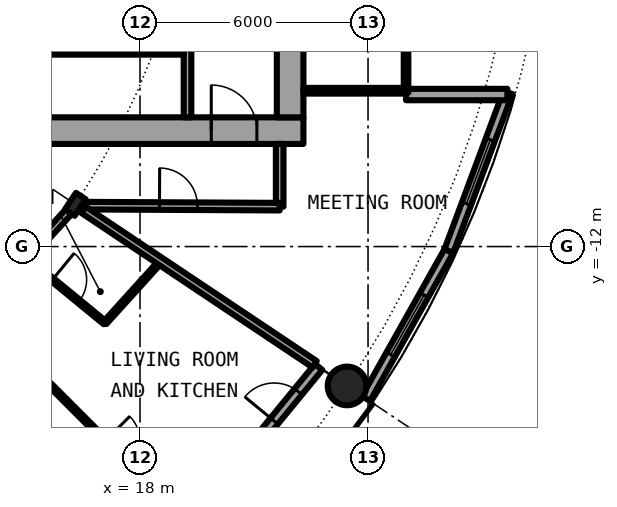
"""IFC4 building model, lengths in metres.
Left out: names, types, materials, properties, quantities, classifications, styles, units other than length and angle.
Written with IfcOpenShell. Run it as: python <this file> out.ifc"""

import sys

from ifc_helpers import new_model, si_unit, direction, frame, frame_2d, origin, origin_2d, place, context, subcontext, project, spatial, rectangle, hollow_circle, i_section, extrude, element, fill, save


model = new_model("IFC4")
c1 = context("Model", 3, precision=1e-05, world=origin(), true_north=direction((0.0, 1.0)))
c2 = subcontext(c1, "Body", "Model", "MODEL_VIEW")
j1 = project(units=[si_unit("LENGTHUNIT", "METRE"), si_unit("PLANEANGLEUNIT", "RADIAN")], contexts=[c1])
p1 = place(None, origin())
s1 = spatial("IfcSite", under=j1, at=p1, CompositionType="ELEMENT")
p2 = place(p1, origin())
s2 = spatial("IfcBuilding", under=s1, at=p2, CompositionType="ELEMENT")
p3 = place(p2, frame((0.0, 0.0, 75.8)))
s3 = spatial("IfcBuildingStorey", under=s2, at=p3, CompositionType="ELEMENT", Elevation=75.8)
p4 = place(p3, frame((23.448, -15.667, 0.0), z_axis=(0.0, 0.0, 1.0), x_axis=(1.0, 0.0, 0.0)))
e1 = element("IfcColumn", 1, at=p4, inside=s3, PredefinedType="COLUMN", context=c2, shape_type="SweptSolid", body=[
    extrude(hollow_circle(Radius=0.508, WallThickness=0.04, at=origin_2d()), origin(), (0.0, 0.0, 1.0), 3.05),
])
p5 = place(p3, frame((16.297, -10.889, 0.0), z_axis=(0.0, 0.0, 1.0), x_axis=(0.831469612303, -0.55557023302, 0.0)))
e2 = element("IfcColumn", 2, at=p5, inside=s3, PredefinedType="COLUMN", context=c2, shape_type="SweptSolid", body=[
    extrude(i_section(OverallWidth=0.306, OverallDepth=0.524, WebThickness=0.021, FlangeThickness=0.04, FilletRadius=0.027, at=origin_2d()), origin(), (0.0, 0.0, 1.0), 3.05),
])
p6 = place(p3, frame((19.304, -19.304, 0.0), z_axis=(0.0, 0.0, 1.0), x_axis=(0.634382322723, 0.773019449054, 0.0)))
e3 = element("IfcWall", 3, at=p6, inside=s3, PredefinedType="SOLIDWALL", context=c2, shape_type="SweptSolid", body=[
    extrude(rectangle(XDim=5.352, YDim=0.25, at=frame_2d((2.676, 0.0))), origin(), (0.0, 0.0, 1.0), 2.7),
])
p7 = place(p6, frame((0.441, 0.0, 0.3)))
e4 = element("IfcOpeningElement", 4, at=p7, cuts=e3, PredefinedType="OPENING", context=c2, shape_type="SweptSolid", body=[
    extrude(rectangle(XDim=1.8, YDim=2.1, at=frame_2d((0.9, 1.05))), frame((0.0, 0.135, 0.0), z_axis=(0.0, -1.0, 0.0), x_axis=(1.0, 0.0, 0.0)), (0.0, 0.0, 1.0), 0.27),
])
p8 = place(p6, frame((3.51, 0.0, 0.0)))
e5 = element("IfcOpeningElement", 5, at=p8, cuts=e3, PredefinedType="OPENING", context=c2, shape_type="SweptSolid", body=[
    extrude(rectangle(XDim=1.0, YDim=2.2, at=frame_2d((0.5, 1.1))), frame((0.0, 0.135, 0.0), z_axis=(0.0, -1.0, 0.0), x_axis=(1.0, 0.0, 0.0)), (0.0, 0.0, 1.0), 0.27),
])
p9 = place(p3, frame((23.946, -16.0, 0.0), z_axis=(0.0, 0.0, 1.0), x_axis=(0.489696356642, 0.871893042919, 0.0)))
e6 = element("IfcWall", 6, at=p9, inside=s3, PredefinedType="SOLIDWALL", context=c2, shape_type="SweptSolid", body=[
    extrude(rectangle(XDim=4.454, YDim=0.25, at=frame_2d((2.227, 0.0))), origin(), (0.0, 0.0, 1.0), 2.7),
])
p10 = place(p9, frame((1.327, 0.0, 0.3)))
e7 = element("IfcOpeningElement", 7, at=p10, cuts=e6, PredefinedType="OPENING", context=c2, shape_type="SweptSolid", body=[
    extrude(rectangle(XDim=1.8, YDim=2.1, at=frame_2d((0.9, 1.05))), frame((0.0, 0.135, 0.0), z_axis=(0.0, -1.0, 0.0), x_axis=(1.0, 0.0, 0.0)), (0.0, 0.0, 1.0), 0.27),
])
p11 = place(p3, frame((26.127, -12.117, 0.0), z_axis=(0.0, 0.0, 1.0), x_axis=(0.349247811493, 0.937030397675, 0.0)))
e8 = element("IfcWall", 8, at=p11, inside=s3, PredefinedType="SOLIDWALL", context=c2, shape_type="SweptSolid", body=[
    extrude(rectangle(XDim=4.452, YDim=0.25, at=frame_2d((2.226, 0.0))), origin(), (0.0, 0.0, 1.0), 2.7),
])
p12 = place(p11, frame((1.327, 0.0, 0.3)))
e9 = element("IfcOpeningElement", 9, at=p12, cuts=e8, PredefinedType="OPENING", context=c2, shape_type="SweptSolid", body=[
    extrude(rectangle(XDim=1.8, YDim=2.1, at=frame_2d((0.9, 1.05))), frame((0.0, 0.135, 0.0), z_axis=(0.0, -1.0, 0.0), x_axis=(1.0, 0.0, 0.0)), (0.0, 0.0, 1.0), 0.27),
])
p13 = place(p3, frame((25.0, -8.0, 0.0), z_axis=(0.0, 0.0, 1.0), x_axis=(1.0, 0.0, 0.0)))
e10 = element("IfcWall", 10, at=p13, inside=s3, PredefinedType="SOLIDWALL", context=c2, shape_type="SweptSolid", body=[
    extrude(rectangle(XDim=2.667, YDim=0.3, at=frame_2d((1.333, 0.0))), origin(), (0.0, 0.0, 1.0), 2.7),
])
p14 = place(p3, frame((8.3, -8.95, 0.0), z_axis=(0.0, 0.0, 1.0), x_axis=(1.0, 0.0, 0.0)))
e11 = element("IfcWall", 11, at=p14, inside=s3, PredefinedType="SHEAR", context=c2, shape_type="SweptSolid", body=[
    extrude(rectangle(XDim=14.0, YDim=0.7, at=frame_2d((7.0, 0.0))), origin(), (0.0, 0.0, 1.0), 3.05),
])
p15 = place(p14, frame((11.575, 0.0, 0.0)))
e12 = element("IfcOpeningElement", 12, at=p15, cuts=e11, PredefinedType="OPENING", context=c2, shape_type="SweptSolid", body=[
    extrude(rectangle(XDim=1.2, YDim=2.3, at=frame_2d((0.6, 1.15))), frame((0.0, 0.36, 0.0), z_axis=(0.0, -1.0, 0.0), x_axis=(1.0, 0.0, 0.0)), (0.0, 0.0, 1.0), 0.72),
])
p16 = place(p3, frame((21.95, 8.6, 0.0), z_axis=(0.0, 0.0, 1.0), x_axis=(0.0, -1.0, 0.0)))
e13 = element("IfcWall", 13, at=p16, inside=s3, PredefinedType="SHEAR", context=c2, shape_type="SweptSolid", body=[
    extrude(rectangle(XDim=17.2, YDim=0.7, at=frame_2d((8.6, 0.0))), origin(), (0.0, 0.0, 1.0), 3.05),
])
p17 = place(p16, frame((7.7, 0.0, 0.0)))
e14 = element("IfcOpeningElement", 14, at=p17, cuts=e13, PredefinedType="OPENING", context=c2, shape_type="SweptSolid", body=[
    extrude(rectangle(XDim=1.8, YDim=2.3, at=frame_2d((0.9, 1.15))), frame((0.0, 0.36, 0.0), z_axis=(0.0, -1.0, 0.0), x_axis=(1.0, 0.0, 0.0)), (0.0, 0.0, 1.0), 0.72),
])
p18 = place(p3, frame((19.25, -8.6, 0.0), z_axis=(0.0, 0.0, 1.0), x_axis=(0.0, 1.0, 0.0)))
e15 = element("IfcWall", 15, at=p18, inside=s3, PredefinedType="SOLIDWALL", context=c2, shape_type="SweptSolid", body=[
    extrude(rectangle(XDim=7.025, YDim=0.2, at=frame_2d((3.513, 0.0))), origin(), (0.0, 0.0, 1.0), 2.7),
])
p19 = place(p18, frame((2.35, 0.0, 0.0)))
e16 = element("IfcOpeningElement", 16, at=p19, cuts=e15, PredefinedType="OPENING", context=c2, shape_type="SweptSolid", body=[
    extrude(rectangle(XDim=1.1, YDim=2.3, at=frame_2d((0.55, 1.15))), frame((0.0, 0.11, 0.0), z_axis=(0.0, -1.0, 0.0), x_axis=(1.0, 0.0, 0.0)), (0.0, 0.0, 1.0), 0.22),
])
p20 = place(p3, frame((15.45, -6.875, 0.0), z_axis=(0.0, 0.0, 1.0), x_axis=(1.0, 0.0, 0.0)))
e17 = element("IfcWall", 17, at=p20, inside=s3, PredefinedType="PARTITIONING", context=c2, shape_type="SweptSolid", body=[
    extrude(rectangle(XDim=3.7, YDim=0.15, at=frame_2d((1.85, 0.0))), origin(), (0.0, 0.0, 1.0), 2.7),
])
p21 = place(p20, frame((1.4, 0.0, 0.0)))
e18 = element("IfcOpeningElement", 18, at=p21, cuts=e17, PredefinedType="OPENING", context=c2, shape_type="SweptSolid", body=[
    extrude(rectangle(XDim=0.9, YDim=2.3, at=frame_2d((0.45, 1.15))), frame((0.0, 0.085, 0.0), z_axis=(0.0, -1.0, 0.0), x_axis=(1.0, 0.0, 0.0)), (0.0, 0.0, 1.0), 0.17),
])
p22 = place(p3, frame((22.3, -7.9, 0.0), z_axis=(0.0, 0.0, 1.0), x_axis=(1.0, 0.0, 0.0)))
e19 = element("IfcWall", 19, at=p22, inside=s3, PredefinedType="PARTITIONING", context=c2, shape_type="SweptSolid", body=[
    extrude(rectangle(XDim=2.64, YDim=0.15, at=frame_2d((1.32, 0.0))), origin(), (0.0, 0.0, 1.0), 2.7),
])
p23 = place(p3, frame((25.0, -7.95, 0.0), z_axis=(0.0, 0.0, 1.0), x_axis=(0.0, 1.0, 0.0)))
e20 = element("IfcWall", 20, at=p23, inside=s3, PredefinedType="PARTITIONING", context=c2, shape_type="SweptSolid", body=[
    extrude(rectangle(XDim=15.9, YDim=0.12, at=frame_2d((7.95, 0.0))), origin(), (0.0, 0.0, 1.0), 2.7),
])
p24 = place(p23, frame((0.95, 0.0, 0.1)))
e21 = element("IfcOpeningElement", 21, at=p24, cuts=e20, PredefinedType="OPENING", context=c2, shape_type="SweptSolid", body=[
    extrude(rectangle(XDim=14.0, YDim=2.35, at=frame_2d((7.0, 1.175))), frame((0.0, 0.07, 0.0), z_axis=(0.0, -1.0, 0.0), x_axis=(1.0, 0.0, 0.0)), (0.0, 0.0, 1.0), 0.14),
])
p25 = place(p3, frame((17.077, -14.006, 0.0), z_axis=(0.0, 0.0, 1.0), x_axis=(0.671396556615, 0.741098282123, 0.0)))
e22 = element("IfcWall", 22, at=p25, inside=s3, PredefinedType="PARTITIONING", context=c2, shape_type="SweptSolid", body=[
    extrude(rectangle(XDim=2.182, YDim=0.1, at=frame_2d((1.091, 0.0))), origin(), (0.0, 0.0, 1.0), 2.7),
])
p26 = place(p3, frame((21.675, -10.95, 0.0), z_axis=(0.0, 0.0, 1.0), x_axis=(0.0, 1.0, 0.0)))
e23 = element("IfcWall", 23, at=p26, inside=s3, PredefinedType="PARTITIONING", context=c2, shape_type="SweptSolid", body=[
    extrude(rectangle(XDim=1.65, YDim=0.2, at=frame_2d((0.825, 0.0))), origin(), (0.0, 0.0, 1.0), 2.7),
])
p27 = place(p3, frame((12.434, -15.151, 0.0), z_axis=(0.0, 0.0, 1.0), x_axis=(0.671601747072, 0.740912338492, 0.0)))
e24 = element("IfcWall", 24, at=p27, inside=s3, PredefinedType="PARTITIONING", context=c2, shape_type="SweptSolid", body=[
    extrude(rectangle(XDim=5.597, YDim=0.2, at=frame_2d((2.799, 0.0))), origin(), (0.0, 0.0, 1.0), 2.38),
])
p28 = place(p27, frame((1.417, 0.0, 0.0)))
e25 = element("IfcOpeningElement", 25, at=p28, cuts=e24, PredefinedType="OPENING", context=c2, shape_type="SweptSolid", body=[
    extrude(rectangle(XDim=1.0, YDim=2.3, at=frame_2d((0.5, 1.15))), frame((0.0, 0.11, 0.0), z_axis=(0.0, -1.0, 0.0), x_axis=(1.0, 0.0, 0.0)), (0.0, 0.0, 1.0), 0.22),
])
p29 = place(p3, frame((16.589, -10.924, 0.0), z_axis=(0.0, 0.0, 1.0), x_axis=(0.999987054722, -0.005088259783, 0.0)))
e26 = element("IfcWall", 26, at=p29, inside=s3, PredefinedType="PARTITIONING", context=c2, shape_type="SweptSolid", body=[
    extrude(rectangle(XDim=5.086, YDim=0.2, at=frame_2d((2.543, 0.0))), origin(), (0.0, 0.0, 1.0), 2.7),
])
p30 = place(p29, frame((1.923, 0.0, 0.0)))
e27 = element("IfcOpeningElement", 27, at=p30, cuts=e26, PredefinedType="OPENING", context=c2, shape_type="SweptSolid", body=[
    extrude(rectangle(XDim=1.0, YDim=2.3, at=frame_2d((0.5, 1.15))), frame((0.0, 0.11, 0.0), z_axis=(0.0, -1.0, 0.0), x_axis=(1.0, 0.0, 0.0)), (0.0, 0.0, 1.0), 0.22),
])
p31 = place(p3, frame((12.434, -15.151, 0.0), z_axis=(0.0, 0.0, 1.0), x_axis=(0.634381303318, -0.773020285633, 0.0)))
e28 = element("IfcWall", 28, at=p31, inside=s3, PredefinedType="PARTITIONING", context=c2, shape_type="SweptSolid", body=[
    extrude(rectangle(XDim=7.576, YDim=0.2, at=frame_2d((3.788, 0.0))), origin(), (0.0, 0.0, 1.0), 2.7),
])
p32 = place(p3, frame((15.009, -12.31, 0.0), z_axis=(0.0, 0.0, 1.0), x_axis=(0.77319617123, -0.634166918717, 0.0)))
e29 = element("IfcWall", 29, at=p32, inside=s3, PredefinedType="PARTITIONING", context=c2, shape_type="SweptSolid", body=[
    extrude(rectangle(XDim=2.675, YDim=0.1, at=frame_2d((1.337, 0.0))), origin(), (0.0, 0.0, 1.0), 2.7),
])
p33 = place(p32, frame((0.887, 0.0, 0.0)))
e30 = element("IfcOpeningElement", 30, at=p33, cuts=e29, PredefinedType="OPENING", context=c2, shape_type="SweptSolid", body=[
    extrude(rectangle(XDim=0.9, YDim=2.3, at=frame_2d((0.45, 1.15))), frame((0.0, 0.06, 0.0), z_axis=(0.0, -1.0, 0.0), x_axis=(1.0, 0.0, 0.0)), (0.0, 0.0, 1.0), 0.12),
])
p34 = place(p3, frame((15.612, -15.622, 0.0), z_axis=(0.0, 0.0, 1.0), x_axis=(0.706914880313, -0.707298629994, 0.0)))
e31 = element("IfcWall", 31, at=p34, inside=s3, PredefinedType="PARTITIONING", context=c2, shape_type="SweptSolid", body=[
    extrude(rectangle(XDim=5.09, YDim=0.1, at=frame_2d((2.545, 0.0))), origin(), (0.0, 0.0, 1.0), 2.7),
])
p35 = place(p34, frame((2.095, 0.0, 0.0)))
e32 = element("IfcOpeningElement", 32, at=p35, cuts=e31, PredefinedType="OPENING", context=c2, shape_type="SweptSolid", body=[
    extrude(rectangle(XDim=0.9, YDim=2.3, at=frame_2d((0.45, 1.15))), frame((0.0, 0.06, 0.0), z_axis=(0.0, -1.0, 0.0), x_axis=(1.0, 0.0, 0.0)), (0.0, 0.0, 1.0), 0.12),
])
p36 = place(p3, frame((16.515, -11.035, 0.0), z_axis=(0.0, 0.0, 1.0), x_axis=(0.831505405283, -0.555516661303, 0.0)))
e33 = element("IfcWall", 33, at=p36, inside=s3, PredefinedType="PARTITIONING", context=c2, shape_type="SweptSolid", body=[
    extrude(rectangle(XDim=7.312, YDim=0.2, at=frame_2d((3.656, 0.0))), origin(), (0.0, 0.0, 1.0), 2.7),
])
p37 = place(p8, origin())
e34 = element("IfcDoor", 34, at=p37, inside=s3, OperationType="SINGLE_SWING_LEFT", PredefinedType="DOOR", context=c2, shape_type="SweptSolid", body=[
    extrude(rectangle(XDim=1.0, YDim=2.2, at=frame_2d((0.5, 1.1))), frame((0.0, 0.025, 0.0), z_axis=(0.0, -1.0, 0.0), x_axis=(1.0, 0.0, 0.0)), (0.0, 0.0, 1.0), 0.05),
])
fill(e5, e34)
p38 = place(p10, origin())
e35 = element("IfcWindow", 35, at=p38, inside=s3, PartitioningType="SINGLE_PANEL", PredefinedType="WINDOW", context=c2, shape_type="SweptSolid", body=[
    extrude(rectangle(XDim=1.8, YDim=2.1, at=frame_2d((0.9, 1.05))), frame((0.0, 0.03, 0.0), z_axis=(0.0, -1.0, 0.0), x_axis=(1.0, 0.0, 0.0)), (0.0, 0.0, 1.0), 0.06),
])
fill(e7, e35)
p39 = place(p12, origin())
e36 = element("IfcWindow", 36, at=p39, inside=s3, PartitioningType="SINGLE_PANEL", PredefinedType="WINDOW", context=c2, shape_type="SweptSolid", body=[
    extrude(rectangle(XDim=1.8, YDim=2.1, at=frame_2d((0.9, 1.05))), frame((0.0, 0.03, 0.0), z_axis=(0.0, -1.0, 0.0), x_axis=(1.0, 0.0, 0.0)), (0.0, 0.0, 1.0), 0.06),
])
fill(e9, e36)
p40 = place(p21, origin())
e37 = element("IfcDoor", 37, at=p40, inside=s3, OperationType="SINGLE_SWING_LEFT", PredefinedType="DOOR", context=c2, shape_type="SweptSolid", body=[
    extrude(rectangle(XDim=0.9, YDim=2.3, at=frame_2d((0.45, 1.15))), frame((0.0, 0.025, 0.0), z_axis=(0.0, -1.0, 0.0), x_axis=(1.0, 0.0, 0.0)), (0.0, 0.0, 1.0), 0.05),
])
fill(e18, e37)
p41 = place(p15, origin())
e38 = element("IfcDoor", 38, at=p41, inside=s3, OperationType="SINGLE_SWING_LEFT", PredefinedType="DOOR", context=c2, shape_type="SweptSolid", body=[
    extrude(rectangle(XDim=1.2, YDim=2.3, at=frame_2d((0.6, 1.15))), frame((0.0, 0.025, 0.0), z_axis=(0.0, -1.0, 0.0), x_axis=(1.0, 0.0, 0.0)), (0.0, 0.0, 1.0), 0.05),
])
fill(e12, e38)
p42 = place(p24, origin())
e39 = element("IfcWindow", 39, at=p42, inside=s3, PartitioningType="SINGLE_PANEL", PredefinedType="WINDOW", context=c2, shape_type="SweptSolid", body=[
    extrude(rectangle(XDim=14.0, YDim=2.35, at=frame_2d((7.0, 1.175))), frame((0.0, 0.03, 0.0), z_axis=(0.0, -1.0, 0.0), x_axis=(1.0, 0.0, 0.0)), (0.0, 0.0, 1.0), 0.06),
])
fill(e21, e39)
p43 = place(p33, origin())
e40 = element("IfcDoor", 40, at=p43, inside=s3, OperationType="SINGLE_SWING_RIGHT", PredefinedType="DOOR", context=c2, shape_type="SweptSolid", body=[
    extrude(rectangle(XDim=0.9, YDim=2.3, at=frame_2d((0.45, 1.15))), frame((0.0, 0.025, 0.0), z_axis=(0.0, -1.0, 0.0), x_axis=(1.0, 0.0, 0.0)), (0.0, 0.0, 1.0), 0.05),
])
fill(e30, e40)
p44 = place(p30, origin())
e41 = element("IfcDoor", 41, at=p44, inside=s3, OperationType="SINGLE_SWING_LEFT", PredefinedType="DOOR", context=c2, shape_type="SweptSolid", body=[
    extrude(rectangle(XDim=1.0, YDim=2.3, at=frame_2d((0.5, 1.15))), frame((0.0, 0.025, 0.0), z_axis=(0.0, -1.0, 0.0), x_axis=(1.0, 0.0, 0.0)), (0.0, 0.0, 1.0), 0.05),
])
fill(e27, e41)
save(model, sys.argv[1])
